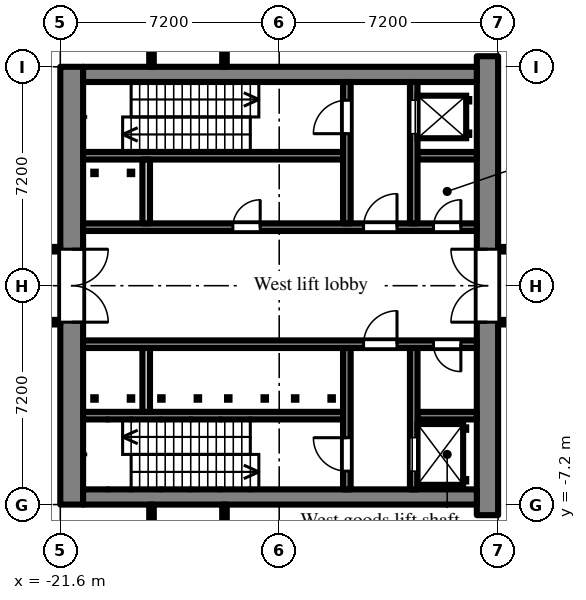
"""IFC4 building model, lengths in metres.
Left out: names, types, materials, properties, quantities, classifications, styles, units other than length and angle.
Written with IfcOpenShell. Run it as: python <this file> out.ifc"""

import sys

from ifc_helpers import new_model, si_unit, direction, frame, frame_2d, origin, place, context, subcontext, project, spatial, rectangle, extrude, element, fill, save


model = new_model("IFC4")
c1 = context("Model", 3, precision=1e-05, world=origin(), true_north=direction((0.0, 1.0)))
c2 = subcontext(c1, "Body", "Model", "MODEL_VIEW")
j1 = project(units=[si_unit("LENGTHUNIT", "METRE"), si_unit("PLANEANGLEUNIT", "RADIAN")], contexts=[c1])
p1 = place(None, origin())
s1 = spatial("IfcSite", under=j1, at=p1, CompositionType="ELEMENT")
p2 = place(p1, origin())
s2 = spatial("IfcBuilding", under=s1, at=p2, CompositionType="ELEMENT")
p3 = place(p2, frame((0.0, 0.0, -4.8)))
s3 = spatial("IfcBuildingStorey", under=s2, at=p3, CompositionType="ELEMENT", Elevation=-4.8)
p4 = place(p3, frame((-7.55, -7.548, 0.0), z_axis=(0.0, 0.0, 1.0), x_axis=(0.0, 1.0, 0.0)))
e1 = element("IfcWall", 1, at=p4, inside=s3, PredefinedType="SHEAR", context=c2, shape_type="SweptSolid", body=[
    extrude(rectangle(XDim=15.096, YDim=0.7, at=frame_2d((7.548, 0.0))), origin(), (0.0, 0.0, 1.0), 4.35),
])
p5 = place(p4, frame((6.348, 0.0, 0.0)))
e2 = element("IfcOpeningElement", 2, at=p5, cuts=e1, PredefinedType="OPENING", context=c2, shape_type="SweptSolid", body=[
    extrude(rectangle(XDim=2.4, YDim=2.2, at=frame_2d((1.2, 1.1))), frame((0.0, 0.36, 0.0), z_axis=(0.0, -1.0, 0.0), x_axis=(1.0, 0.0, 0.0)), (0.0, 0.0, 1.0), 0.72),
])
p6 = place(p3, frame((-21.225, -7.2, 0.0), z_axis=(0.0, 0.0, 1.0), x_axis=(0.0, 1.0, 0.0)))
e3 = element("IfcWall", 3, at=p6, inside=s3, PredefinedType="SHEAR", context=c2, shape_type="SweptSolid", body=[
    extrude(rectangle(XDim=14.4, YDim=0.75, at=frame_2d((7.2, 0.0))), origin(), (0.0, 0.0, 1.0), 4.35),
])
p7 = place(p6, frame((6.0, 0.0, 0.0)))
e4 = element("IfcOpeningElement", 4, at=p7, cuts=e3, PredefinedType="OPENING", context=c2, shape_type="SweptSolid", body=[
    extrude(rectangle(XDim=2.4, YDim=2.2, at=frame_2d((1.2, 1.1))), frame((0.0, 0.385, 0.0), z_axis=(0.0, -1.0, 0.0), x_axis=(1.0, 0.0, 0.0)), (0.0, 0.0, 1.0), 0.77),
])
p8 = place(p3, frame((-7.9, 6.95, 0.0), z_axis=(0.0, 0.0, 1.0), x_axis=(-1.0, 0.0, 0.0)))
e5 = element("IfcWall", 5, at=p8, inside=s3, PredefinedType="SHEAR", context=c2, shape_type="SweptSolid", body=[
    extrude(rectangle(XDim=12.95, YDim=0.5, at=frame_2d((6.475, 0.0))), origin(), (0.0, 0.0, 1.0), 4.35),
])
p9 = place(p3, frame((-7.9, 1.925, 0.0), z_axis=(0.0, 0.0, 1.0), x_axis=(-1.0, 0.0, 0.0)))
e6 = element("IfcWall", 6, at=p9, inside=s3, PredefinedType="SHEAR", context=c2, shape_type="SweptSolid", body=[
    extrude(rectangle(XDim=12.95, YDim=0.25, at=frame_2d((6.475, 0.0))), origin(), (0.0, 0.0, 1.0), 4.35),
])
p10 = place(p9, frame((0.525, 0.0, 0.0)))
e7 = element("IfcOpeningElement", 7, at=p10, cuts=e6, PredefinedType="OPENING", context=c2, shape_type="SweptSolid", body=[
    extrude(rectangle(XDim=0.9, YDim=2.1, at=frame_2d((0.45, 1.05))), frame((0.0, 0.135, 0.0), z_axis=(0.0, -1.0, 0.0), x_axis=(1.0, 0.0, 0.0)), (0.0, 0.0, 1.0), 0.27),
])
p11 = place(p9, frame((2.625, 0.0, 0.0)))
e8 = element("IfcOpeningElement", 8, at=p11, cuts=e6, PredefinedType="OPENING", context=c2, shape_type="SweptSolid", body=[
    extrude(rectangle(XDim=1.1, YDim=2.1, at=frame_2d((0.55, 1.05))), frame((0.0, 0.135, 0.0), z_axis=(0.0, -1.0, 0.0), x_axis=(1.0, 0.0, 0.0)), (0.0, 0.0, 1.0), 0.27),
])
p12 = place(p9, frame((7.125, 0.0, 0.0)))
e9 = element("IfcOpeningElement", 9, at=p12, cuts=e6, PredefinedType="OPENING", context=c2, shape_type="SweptSolid", body=[
    extrude(rectangle(XDim=0.9, YDim=2.1, at=frame_2d((0.45, 1.05))), frame((0.0, 0.135, 0.0), z_axis=(0.0, -1.0, 0.0), x_axis=(1.0, 0.0, 0.0)), (0.0, 0.0, 1.0), 0.27),
])
p13 = place(p3, frame((-7.9, 4.275, 0.0), z_axis=(0.0, 0.0, 1.0), x_axis=(-1.0, 0.0, 0.0)))
e10 = element("IfcWall", 10, at=p13, inside=s3, PredefinedType="SHEAR", context=c2, shape_type="SweptSolid", body=[
    extrude(rectangle(XDim=1.95, YDim=0.25, at=frame_2d((0.975, 0.0))), origin(), (0.0, 0.0, 1.0), 4.35),
])
p14 = place(p3, frame((-12.3, 4.275, 0.0), z_axis=(0.0, 0.0, 1.0), x_axis=(-1.0, 0.0, 0.0)))
e11 = element("IfcWall", 11, at=p14, inside=s3, PredefinedType="SHEAR", context=c2, shape_type="SweptSolid", body=[
    extrude(rectangle(XDim=8.55, YDim=0.25, at=frame_2d((4.275, 0.0))), origin(), (0.0, 0.0, 1.0), 4.35),
])
p15 = place(p3, frame((-9.975, 2.05, 0.0), z_axis=(0.0, 0.0, 1.0), x_axis=(0.0, 1.0, 0.0)))
e12 = element("IfcWall", 12, at=p15, inside=s3, PredefinedType="SHEAR", context=c2, shape_type="SweptSolid", body=[
    extrude(rectangle(XDim=4.65, YDim=0.25, at=frame_2d((2.325, 0.0))), origin(), (0.0, 0.0, 1.0), 4.35),
])
p16 = place(p15, frame((2.95, 0.0, 0.0)))
e13 = element("IfcOpeningElement", 13, at=p16, cuts=e12, PredefinedType="OPENING", context=c2, shape_type="SweptSolid", body=[
    extrude(rectangle(XDim=1.1, YDim=2.1, at=frame_2d((0.55, 1.05))), frame((0.0, 0.135, 0.0), z_axis=(0.0, -1.0, 0.0), x_axis=(1.0, 0.0, 0.0)), (0.0, 0.0, 1.0), 0.27),
])
p17 = place(p3, frame((-12.175, 2.05, 0.0), z_axis=(0.0, 0.0, 1.0), x_axis=(0.0, 1.0, 0.0)))
e14 = element("IfcWall", 14, at=p17, inside=s3, PredefinedType="SHEAR", context=c2, shape_type="SweptSolid", body=[
    extrude(rectangle(XDim=4.65, YDim=0.25, at=frame_2d((2.325, 0.0))), origin(), (0.0, 0.0, 1.0), 4.35),
])
p18 = place(p17, frame((2.95, 0.0, 0.0)))
e15 = element("IfcOpeningElement", 15, at=p18, cuts=e14, PredefinedType="OPENING", context=c2, shape_type="SweptSolid", body=[
    extrude(rectangle(XDim=1.1, YDim=2.1, at=frame_2d((0.55, 1.05))), frame((0.0, 0.135, 0.0), z_axis=(0.0, -1.0, 0.0), x_axis=(1.0, 0.0, 0.0)), (0.0, 0.0, 1.0), 0.27),
])
p19 = place(p3, frame((-18.775, 2.05, 0.0), z_axis=(0.0, 0.0, 1.0), x_axis=(0.0, 1.0, 0.0)))
e16 = element("IfcWall", 16, at=p19, inside=s3, PredefinedType="PARTITIONING", context=c2, shape_type="SweptSolid", body=[
    extrude(rectangle(XDim=2.1, YDim=0.25, at=frame_2d((1.05, 0.0))), origin(), (0.0, 0.0, 1.0), 4.35),
])
p20 = place(p3, frame((-7.9, -6.95, 0.0), z_axis=(0.0, 0.0, 1.0), x_axis=(-1.0, 0.0, 0.0)))
e17 = element("IfcWall", 17, at=p20, inside=s3, PredefinedType="SHEAR", context=c2, shape_type="SweptSolid", body=[
    extrude(rectangle(XDim=12.95, YDim=0.5, at=frame_2d((6.475, 0.0))), origin(), (0.0, 0.0, 1.0), 4.35),
])
p21 = place(p3, frame((-7.9, -1.925, 0.0), z_axis=(0.0, 0.0, 1.0), x_axis=(-1.0, 0.0, 0.0)))
e18 = element("IfcWall", 18, at=p21, inside=s3, PredefinedType="SHEAR", context=c2, shape_type="SweptSolid", body=[
    extrude(rectangle(XDim=12.95, YDim=0.25, at=frame_2d((6.475, 0.0))), origin(), (0.0, 0.0, 1.0), 4.35),
])
p22 = place(p21, frame((0.525, 0.0, 0.0)))
e19 = element("IfcOpeningElement", 19, at=p22, cuts=e18, PredefinedType="OPENING", context=c2, shape_type="SweptSolid", body=[
    extrude(rectangle(XDim=0.9, YDim=2.1, at=frame_2d((0.45, 1.05))), frame((0.0, 0.135, 0.0), z_axis=(0.0, -1.0, 0.0), x_axis=(1.0, 0.0, 0.0)), (0.0, 0.0, 1.0), 0.27),
])
p23 = place(p21, frame((2.625, 0.0, 0.0)))
e20 = element("IfcOpeningElement", 20, at=p23, cuts=e18, PredefinedType="OPENING", context=c2, shape_type="SweptSolid", body=[
    extrude(rectangle(XDim=1.1, YDim=2.1, at=frame_2d((0.55, 1.05))), frame((0.0, 0.135, 0.0), z_axis=(0.0, -1.0, 0.0), x_axis=(1.0, 0.0, 0.0)), (0.0, 0.0, 1.0), 0.27),
])
p24 = place(p3, frame((-7.9, -4.275, 0.0), z_axis=(0.0, 0.0, 1.0), x_axis=(-1.0, 0.0, 0.0)))
e21 = element("IfcWall", 21, at=p24, inside=s3, PredefinedType="SHEAR", context=c2, shape_type="SweptSolid", body=[
    extrude(rectangle(XDim=1.95, YDim=0.25, at=frame_2d((0.975, 0.0))), origin(), (0.0, 0.0, 1.0), 4.35),
])
p25 = place(p3, frame((-12.3, -4.275, 0.0), z_axis=(0.0, 0.0, 1.0), x_axis=(-1.0, 0.0, 0.0)))
e22 = element("IfcWall", 22, at=p25, inside=s3, PredefinedType="SHEAR", context=c2, shape_type="SweptSolid", body=[
    extrude(rectangle(XDim=8.55, YDim=0.25, at=frame_2d((4.275, 0.0))), origin(), (0.0, 0.0, 1.0), 4.35),
])
p26 = place(p3, frame((-9.975, -2.05, 0.0), z_axis=(0.0, 0.0, 1.0), x_axis=(0.0, -1.0, 0.0)))
e23 = element("IfcWall", 23, at=p26, inside=s3, PredefinedType="SHEAR", context=c2, shape_type="SweptSolid", body=[
    extrude(rectangle(XDim=4.65, YDim=0.25, at=frame_2d((2.325, 0.0))), origin(), (0.0, 0.0, 1.0), 4.35),
])
p27 = place(p26, frame((2.95, 0.0, 0.0)))
e24 = element("IfcOpeningElement", 24, at=p27, cuts=e23, PredefinedType="OPENING", context=c2, shape_type="SweptSolid", body=[
    extrude(rectangle(XDim=1.1, YDim=2.1, at=frame_2d((0.55, 1.05))), frame((0.0, 0.135, 0.0), z_axis=(0.0, -1.0, 0.0), x_axis=(1.0, 0.0, 0.0)), (0.0, 0.0, 1.0), 0.27),
])
p28 = place(p3, frame((-12.175, -2.05, 0.0), z_axis=(0.0, 0.0, 1.0), x_axis=(0.0, -1.0, 0.0)))
e25 = element("IfcWall", 25, at=p28, inside=s3, PredefinedType="SHEAR", context=c2, shape_type="SweptSolid", body=[
    extrude(rectangle(XDim=4.65, YDim=0.25, at=frame_2d((2.325, 0.0))), origin(), (0.0, 0.0, 1.0), 4.35),
])
p29 = place(p28, frame((2.95, 0.0, 0.0)))
e26 = element("IfcOpeningElement", 26, at=p29, cuts=e25, PredefinedType="OPENING", context=c2, shape_type="SweptSolid", body=[
    extrude(rectangle(XDim=1.1, YDim=2.1, at=frame_2d((0.55, 1.05))), frame((0.0, 0.135, 0.0), z_axis=(0.0, -1.0, 0.0), x_axis=(1.0, 0.0, 0.0)), (0.0, 0.0, 1.0), 0.27),
])
p30 = place(p3, frame((-18.775, -2.05, 0.0), z_axis=(0.0, 0.0, 1.0), x_axis=(0.0, -1.0, 0.0)))
e27 = element("IfcWall", 27, at=p30, inside=s3, PredefinedType="PARTITIONING", context=c2, shape_type="SweptSolid", body=[
    extrude(rectangle(XDim=2.1, YDim=0.25, at=frame_2d((1.05, 0.0))), origin(), (0.0, 0.0, 1.0), 4.35),
])
p31 = place(p3, frame((-31.125, -1.2, 0.0), z_axis=(0.0, 0.0, 1.0), x_axis=(1.0, 0.0, 0.0)))
e28 = element("IfcWall", 28, at=p31, inside=s3, PredefinedType="PARTITIONING", context=c2, shape_type="SweptSolid", body=[
    extrude(rectangle(XDim=9.525, YDim=0.15, at=frame_2d((4.762, 0.0))), origin(), (0.0, 0.0, 1.0), 4.35),
])
p32 = place(p31, frame((7.075, 0.0, 0.0)))
e29 = element("IfcOpeningElement", 29, at=p32, cuts=e28, PredefinedType="OPENING", context=c2, shape_type="SweptSolid", body=[
    extrude(rectangle(XDim=1.8, YDim=2.1, at=frame_2d((0.9, 1.05))), frame((0.0, 0.085, 0.0), z_axis=(0.0, -1.0, 0.0), x_axis=(1.0, 0.0, 0.0)), (0.0, 0.0, 1.0), 0.17),
])
p33 = place(p3, frame((-31.125, 1.2, 0.0), z_axis=(0.0, 0.0, 1.0), x_axis=(1.0, 0.0, 0.0)))
e30 = element("IfcWall", 30, at=p33, inside=s3, PredefinedType="PARTITIONING", context=c2, shape_type="SweptSolid", body=[
    extrude(rectangle(XDim=9.525, YDim=0.15, at=frame_2d((4.762, 0.0))), origin(), (0.0, 0.0, 1.0), 4.35),
])
p34 = place(p33, frame((0.575, 0.0, 0.0)))
e31 = element("IfcOpeningElement", 31, at=p34, cuts=e30, PredefinedType="OPENING", context=c2, shape_type="SweptSolid", body=[
    extrude(rectangle(XDim=1.8, YDim=2.1, at=frame_2d((0.9, 1.05))), frame((0.0, 0.085, 0.0), z_axis=(0.0, -1.0, 0.0), x_axis=(1.0, 0.0, 0.0)), (0.0, 0.0, 1.0), 0.17),
])
p35 = place(p33, frame((6.875, 0.0, 0.0)))
e32 = element("IfcOpeningElement", 32, at=p35, cuts=e30, PredefinedType="OPENING", context=c2, shape_type="SweptSolid", body=[
    extrude(rectangle(XDim=1.8, YDim=2.1, at=frame_2d((0.9, 1.05))), frame((0.0, 0.085, 0.0), z_axis=(0.0, -1.0, 0.0), x_axis=(1.0, 0.0, 0.0)), (0.0, 0.0, 1.0), 0.17),
])
p36 = place(p3, frame((-18.6, -16.725, 0.0), z_axis=(0.0, 0.0, 1.0), x_axis=(0.0, 1.0, 0.0)))
e33 = element("IfcWall", 33, at=p36, inside=s3, PredefinedType="PARTITIONING", context=c2, shape_type="SweptSolid", body=[
    extrude(rectangle(XDim=9.525, YDim=0.15, at=frame_2d((4.763, 0.0))), origin(), (0.0, 0.0, 1.0), 4.35),
])
p37 = place(p36, frame((0.575, 0.0, 0.0)))
e34 = element("IfcOpeningElement", 34, at=p37, cuts=e33, PredefinedType="OPENING", context=c2, shape_type="SweptSolid", body=[
    extrude(rectangle(XDim=1.8, YDim=2.1, at=frame_2d((0.9, 1.05))), frame((0.0, 0.085, 0.0), z_axis=(0.0, -1.0, 0.0), x_axis=(1.0, 0.0, 0.0)), (0.0, 0.0, 1.0), 0.17),
])
p38 = place(p36, frame((6.875, 0.0, 0.0)))
e35 = element("IfcOpeningElement", 35, at=p38, cuts=e33, PredefinedType="OPENING", context=c2, shape_type="SweptSolid", body=[
    extrude(rectangle(XDim=1.8, YDim=2.1, at=frame_2d((0.9, 1.05))), frame((0.0, 0.085, 0.0), z_axis=(0.0, -1.0, 0.0), x_axis=(1.0, 0.0, 0.0)), (0.0, 0.0, 1.0), 0.17),
])
p39 = place(p3, frame((-18.6, 7.2, 0.0), z_axis=(0.0, 0.0, 1.0), x_axis=(0.0, 1.0, 0.0)))
e36 = element("IfcWall", 36, at=p39, inside=s3, PredefinedType="PARTITIONING", context=c2, shape_type="SweptSolid", body=[
    extrude(rectangle(XDim=9.525, YDim=0.15, at=frame_2d((4.763, 0.0))), origin(), (0.0, 0.0, 1.0), 4.35),
])
p40 = place(p39, frame((0.65, 0.0, 0.0)))
e37 = element("IfcOpeningElement", 37, at=p40, cuts=e36, PredefinedType="OPENING", context=c2, shape_type="SweptSolid", body=[
    extrude(rectangle(XDim=1.8, YDim=2.1, at=frame_2d((0.9, 1.05))), frame((0.0, 0.085, 0.0), z_axis=(0.0, -1.0, 0.0), x_axis=(1.0, 0.0, 0.0)), (0.0, 0.0, 1.0), 0.17),
])
p41 = place(p3, frame((-16.2, -16.875, 0.0), z_axis=(0.0, 0.0, 1.0), x_axis=(0.0, 1.0, 0.0)))
e38 = element("IfcWall", 38, at=p41, inside=s3, PredefinedType="PARTITIONING", context=c2, shape_type="SweptSolid", body=[
    extrude(rectangle(XDim=9.675, YDim=0.15, at=frame_2d((4.837, 0.0))), origin(), (0.0, 0.0, 1.0), 4.35),
])
p42 = place(p41, frame((4.825, 0.0, 0.0)))
e39 = element("IfcOpeningElement", 39, at=p42, cuts=e38, PredefinedType="OPENING", context=c2, shape_type="SweptSolid", body=[
    extrude(rectangle(XDim=1.8, YDim=2.1, at=frame_2d((0.9, 1.05))), frame((0.0, 0.085, 0.0), z_axis=(0.0, -1.0, 0.0), x_axis=(1.0, 0.0, 0.0)), (0.0, 0.0, 1.0), 0.17),
])
p43 = place(p3, frame((-16.2, 7.2, 0.0), z_axis=(0.0, 0.0, 1.0), x_axis=(0.0, 1.0, 0.0)))
e40 = element("IfcWall", 40, at=p43, inside=s3, PredefinedType="PARTITIONING", context=c2, shape_type="SweptSolid", body=[
    extrude(rectangle(XDim=9.675, YDim=0.15, at=frame_2d((4.837, 0.0))), origin(), (0.0, 0.0, 1.0), 4.35),
])
p44 = place(p43, frame((2.95, 0.0, 0.0)))
e41 = element("IfcOpeningElement", 41, at=p44, cuts=e40, PredefinedType="OPENING", context=c2, shape_type="SweptSolid", body=[
    extrude(rectangle(XDim=1.8, YDim=2.1, at=frame_2d((0.9, 1.05))), frame((0.0, 0.085, 0.0), z_axis=(0.0, -1.0, 0.0), x_axis=(1.0, 0.0, 0.0)), (0.0, 0.0, 1.0), 0.17),
])
p45 = place(p43, frame((7.15, 0.0, 0.0)))
e42 = element("IfcOpeningElement", 42, at=p45, cuts=e40, PredefinedType="OPENING", context=c2, shape_type="SweptSolid", body=[
    extrude(rectangle(XDim=1.8, YDim=2.1, at=frame_2d((0.9, 1.05))), frame((0.0, 0.085, 0.0), z_axis=(0.0, -1.0, 0.0), x_axis=(1.0, 0.0, 0.0)), (0.0, 0.0, 1.0), 0.17),
])
p46 = place(p3, frame((-7.2, -1.2, 0.0), z_axis=(0.0, 0.0, 1.0), x_axis=(1.0, 0.0, 0.0)))
e43 = element("IfcWall", 43, at=p46, inside=s3, PredefinedType="PARTITIONING", context=c2, shape_type="SweptSolid", body=[
    extrude(rectangle(XDim=6.075, YDim=0.15, at=frame_2d((3.038, 0.0))), origin(), (0.0, 0.0, 1.0), 4.35),
])
p47 = place(p46, frame((3.55, 0.0, 0.0)))
e44 = element("IfcOpeningElement", 44, at=p47, cuts=e43, PredefinedType="OPENING", context=c2, shape_type="SweptSolid", body=[
    extrude(rectangle(XDim=1.8, YDim=2.1, at=frame_2d((0.9, 1.05))), frame((0.0, 0.085, 0.0), z_axis=(0.0, -1.0, 0.0), x_axis=(1.0, 0.0, 0.0)), (0.0, 0.0, 1.0), 0.17),
])
p48 = place(p3, frame((-7.2, 1.2, 0.0), z_axis=(0.0, 0.0, 1.0), x_axis=(1.0, 0.0, 0.0)))
e45 = element("IfcWall", 45, at=p48, inside=s3, PredefinedType="PARTITIONING", context=c2, shape_type="SweptSolid", body=[
    extrude(rectangle(XDim=6.075, YDim=0.15, at=frame_2d((3.038, 0.0))), origin(), (0.0, 0.0, 1.0), 4.35),
])
p49 = place(p48, frame((0.65, 0.0, 0.0)))
e46 = element("IfcOpeningElement", 46, at=p49, cuts=e45, PredefinedType="OPENING", context=c2, shape_type="SweptSolid", body=[
    extrude(rectangle(XDim=1.8, YDim=2.1, at=frame_2d((0.9, 1.05))), frame((0.0, 0.085, 0.0), z_axis=(0.0, -1.0, 0.0), x_axis=(1.0, 0.0, 0.0)), (0.0, 0.0, 1.0), 0.17),
])
p50 = place(p16, origin())
e47 = element("IfcDoor", 47, at=p50, inside=s3, OperationType="SLIDING_TO_LEFT", PredefinedType="DOOR", context=c2, shape_type="SweptSolid", body=[
    extrude(rectangle(XDim=1.1, YDim=2.1, at=frame_2d((0.55, 1.05))), frame((0.0, 0.025, 0.0), z_axis=(0.0, -1.0, 0.0), x_axis=(1.0, 0.0, 0.0)), (0.0, 0.0, 1.0), 0.05),
])
fill(e13, e47)
p51 = place(p27, origin())
e48 = element("IfcDoor", 48, at=p51, inside=s3, OperationType="SLIDING_TO_LEFT", PredefinedType="DOOR", context=c2, shape_type="SweptSolid", body=[
    extrude(rectangle(XDim=1.1, YDim=2.1, at=frame_2d((0.55, 1.05))), frame((0.0, 0.025, 0.0), z_axis=(0.0, -1.0, 0.0), x_axis=(1.0, 0.0, 0.0)), (0.0, 0.0, 1.0), 0.05),
])
fill(e24, e48)
p52 = place(p18, origin())
e49 = element("IfcDoor", 49, at=p52, inside=s3, OperationType="SINGLE_SWING_LEFT", PredefinedType="DOOR", context=c2, shape_type="SweptSolid", body=[
    extrude(rectangle(XDim=1.1, YDim=2.1, at=frame_2d((0.55, 1.05))), frame((0.0, 0.025, 0.0), z_axis=(0.0, -1.0, 0.0), x_axis=(1.0, 0.0, 0.0)), (0.0, 0.0, 1.0), 0.05),
])
fill(e15, e49)
p53 = place(p29, frame((1.1, 0.0, 0.0), z_axis=(0.0, 0.0, 1.0), x_axis=(-1.0, 0.0, 0.0)))
e50 = element("IfcDoor", 50, at=p53, inside=s3, OperationType="SINGLE_SWING_RIGHT", PredefinedType="DOOR", context=c2, shape_type="SweptSolid", body=[
    extrude(rectangle(XDim=1.1, YDim=2.1, at=frame_2d((0.55, 1.05))), frame((0.0, 0.025, 0.0), z_axis=(0.0, -1.0, 0.0), x_axis=(1.0, 0.0, 0.0)), (0.0, 0.0, 1.0), 0.05),
])
fill(e26, e50)
p54 = place(p10, frame((0.9, 0.0, 0.0), z_axis=(0.0, 0.0, 1.0), x_axis=(-1.0, 0.0, 0.0)))
e51 = element("IfcDoor", 51, at=p54, inside=s3, OperationType="SINGLE_SWING_RIGHT", PredefinedType="DOOR", context=c2, shape_type="SweptSolid", body=[
    extrude(rectangle(XDim=0.9, YDim=2.1, at=frame_2d((0.45, 1.05))), frame((0.0, 0.025, 0.0), z_axis=(0.0, -1.0, 0.0), x_axis=(1.0, 0.0, 0.0)), (0.0, 0.0, 1.0), 0.05),
])
fill(e7, e51)
p55 = place(p22, origin())
e52 = element("IfcDoor", 52, at=p55, inside=s3, OperationType="SINGLE_SWING_LEFT", PredefinedType="DOOR", context=c2, shape_type="SweptSolid", body=[
    extrude(rectangle(XDim=0.9, YDim=2.1, at=frame_2d((0.45, 1.05))), frame((0.0, 0.025, 0.0), z_axis=(0.0, -1.0, 0.0), x_axis=(1.0, 0.0, 0.0)), (0.0, 0.0, 1.0), 0.05),
])
fill(e19, e52)
p56 = place(p11, frame((1.1, 0.0, 0.0), z_axis=(0.0, 0.0, 1.0), x_axis=(-1.0, 0.0, 0.0)))
e53 = element("IfcDoor", 53, at=p56, inside=s3, OperationType="SINGLE_SWING_RIGHT", PredefinedType="DOOR", context=c2, shape_type="SweptSolid", body=[
    extrude(rectangle(XDim=1.1, YDim=2.1, at=frame_2d((0.55, 1.05))), frame((0.0, 0.025, 0.0), z_axis=(0.0, -1.0, 0.0), x_axis=(1.0, 0.0, 0.0)), (0.0, 0.0, 1.0), 0.05),
])
fill(e8, e53)
p57 = place(p23, frame((1.1, 0.0, 0.0), z_axis=(0.0, 0.0, 1.0), x_axis=(-1.0, 0.0, 0.0)))
e54 = element("IfcDoor", 54, at=p57, inside=s3, OperationType="SINGLE_SWING_RIGHT", PredefinedType="DOOR", context=c2, shape_type="SweptSolid", body=[
    extrude(rectangle(XDim=1.1, YDim=2.1, at=frame_2d((0.55, 1.05))), frame((0.0, 0.025, 0.0), z_axis=(0.0, -1.0, 0.0), x_axis=(1.0, 0.0, 0.0)), (0.0, 0.0, 1.0), 0.05),
])
fill(e20, e54)
p58 = place(p5, origin())
e55 = element("IfcDoor", 55, at=p58, inside=s3, OperationType="DOUBLE_DOOR_DOUBLE_SWING", PredefinedType="DOOR", context=c2, shape_type="SweptSolid", body=[
    extrude(rectangle(XDim=2.4, YDim=2.2, at=frame_2d((1.2, 1.1))), frame((0.0, 0.025, 0.0), z_axis=(0.0, -1.0, 0.0), x_axis=(1.0, 0.0, 0.0)), (0.0, 0.0, 1.0), 0.05),
])
fill(e2, e55)
p59 = place(p7, frame((2.4, 0.0, 0.0), z_axis=(0.0, 0.0, 1.0), x_axis=(-1.0, 0.0, 0.0)))
e56 = element("IfcDoor", 56, at=p59, inside=s3, OperationType="DOUBLE_DOOR_DOUBLE_SWING", PredefinedType="DOOR", context=c2, shape_type="SweptSolid", body=[
    extrude(rectangle(XDim=2.4, YDim=2.2, at=frame_2d((1.2, 1.1))), frame((0.0, 0.025, 0.0), z_axis=(0.0, -1.0, 0.0), x_axis=(1.0, 0.0, 0.0)), (0.0, 0.0, 1.0), 0.05),
])
fill(e4, e56)
p60 = place(p12, frame((0.9, 0.0, 0.0), z_axis=(0.0, 0.0, 1.0), x_axis=(-1.0, 0.0, 0.0)))
e57 = element("IfcDoor", 57, at=p60, inside=s3, OperationType="SINGLE_SWING_RIGHT", PredefinedType="DOOR", context=c2, shape_type="SweptSolid", body=[
    extrude(rectangle(XDim=0.9, YDim=2.1, at=frame_2d((0.45, 1.05))), frame((0.0, 0.025, 0.0), z_axis=(0.0, -1.0, 0.0), x_axis=(1.0, 0.0, 0.0)), (0.0, 0.0, 1.0), 0.05),
])
fill(e9, e57)
save(model, sys.argv[1])
